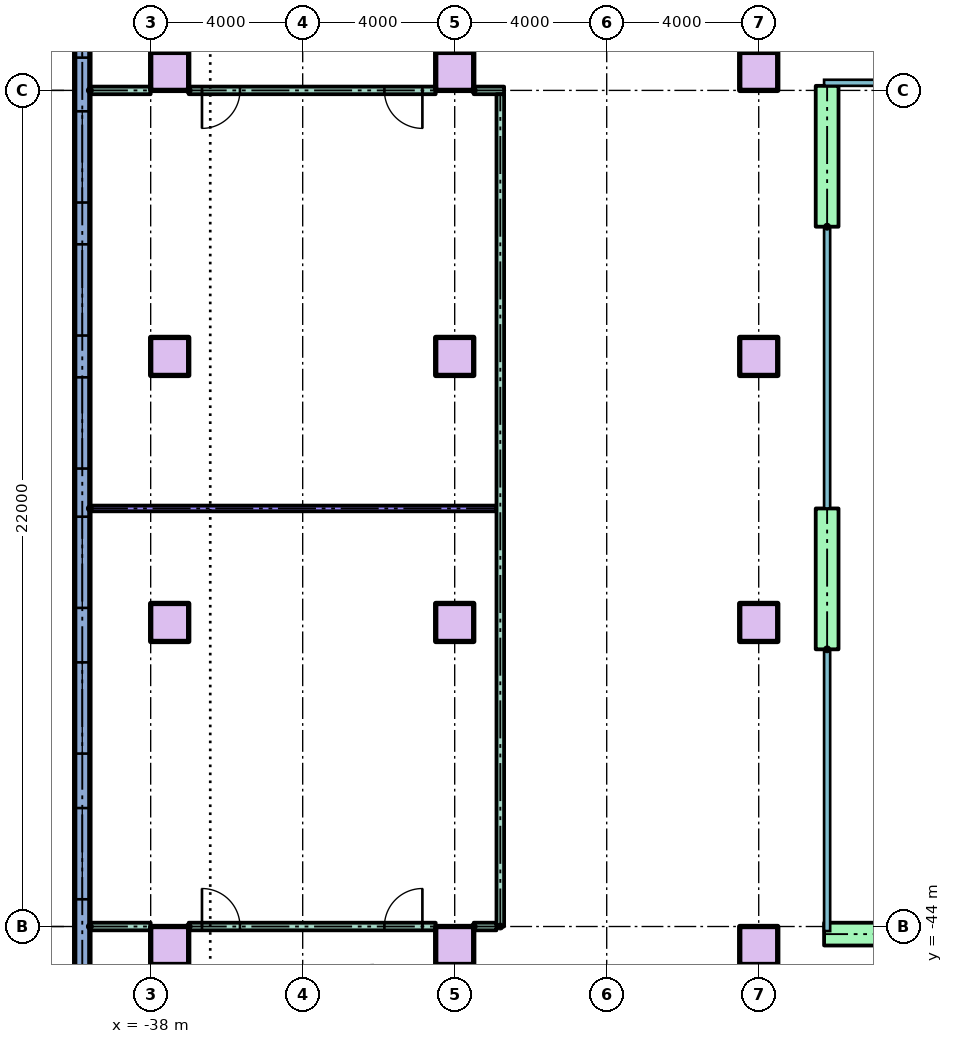
"""IFC4 building model, lengths in metres.
Left out: names, types, materials, properties, quantities, classifications, styles, units other than length and angle.
Written with IfcOpenShell. Run it as: python <this file> out.ifc"""

import sys

from ifc_helpers import new_model, si_unit, direction, frame, frame_2d, origin, origin_2d, place, context, subcontext, project, spatial, rectangle, extrude, element, fill, save


model = new_model("IFC4")
c1 = context("Model", 3, precision=1e-05, world=origin(), true_north=direction((0.0, 1.0)))
c2 = subcontext(c1, "Body", "Model", "MODEL_VIEW")
j1 = project(units=[si_unit("LENGTHUNIT", "METRE"), si_unit("PLANEANGLEUNIT", "RADIAN")], contexts=[c1])
p1 = place(None, origin())
s1 = spatial("IfcSite", under=j1, at=p1, CompositionType="ELEMENT")
p2 = place(p1, origin())
s2 = spatial("IfcBuilding", under=s1, at=p2, CompositionType="ELEMENT")
p3 = place(p2, frame((0.0, 0.0, 22.0)))
s3 = spatial("IfcBuildingStorey", under=s2, at=p3, CompositionType="ELEMENT", Elevation=22.0)
for number, where in (
    (1, (-37.5, -44.5, 0.0)),
    (2, (-30.0, -44.5, 0.0)),
    (3, (-22.0, -44.5, 0.0)),
    (4, (-37.5, -36.0, 0.0)),
    (5, (-30.0, -36.0, 0.0)),
    (6, (-22.0, -36.0, 0.0)),
    (7, (-37.5, -29.0, 0.0)),
    (8, (-30.0, -29.0, 0.0)),
    (9, (-22.0, -29.0, 0.0)),
    (10, (-37.5, -21.5, 0.0)),
    (11, (-30.0, -21.5, 0.0)),
    (12, (-22.0, -21.5, 0.0)),
):
    element("IfcColumn", number, at=place(p3, frame(where)), inside=s3, PredefinedType="COLUMN", context=c2, shape_type="SweptSolid", body=[
        extrude(rectangle(XDim=1.0, YDim=1.0, at=origin_2d()), origin(), (0.0, 0.0, 1.0), 3.7),
    ])
p4 = place(p3, frame((-39.8, 20.0, 0.0), z_axis=(0.0, 0.0, 1.0), x_axis=(0.0, -1.0, 0.0)))
e13 = element("IfcWall", 13, at=p4, inside=s3, PredefinedType="STANDARD", context=c2, shape_type="SweptSolid", body=[
    extrude(rectangle(XDim=70.0, YDim=0.4, at=frame_2d((35.0, 0.0))), origin(), (0.0, 0.0, 1.0), 3.7),
])
p5 = place(p4, frame((1.05, 0.0, 0.9)))
e14 = element("IfcOpeningElement", 14, at=p5, cuts=e13, PredefinedType="OPENING", context=c2, shape_type="SweptSolid", body=[
    extrude(rectangle(XDim=2.4, YDim=2.1, at=frame_2d((1.2, 1.05))), frame((0.0, 0.21, 0.0), z_axis=(0.0, -1.0, 0.0), x_axis=(1.0, 0.0, 0.0)), (0.0, 0.0, 1.0), 0.42),
])
p6 = place(p4, frame((5.55, 0.0, 0.9)))
e15 = element("IfcOpeningElement", 15, at=p6, cuts=e13, PredefinedType="OPENING", context=c2, shape_type="SweptSolid", body=[
    extrude(rectangle(XDim=2.4, YDim=2.1, at=frame_2d((1.2, 1.05))), frame((0.0, 0.21, 0.0), z_axis=(0.0, -1.0, 0.0), x_axis=(1.0, 0.0, 0.0)), (0.0, 0.0, 1.0), 0.42),
])
p7 = place(p4, frame((9.863, 0.0, 0.9)))
e16 = element("IfcOpeningElement", 16, at=p7, cuts=e13, PredefinedType="OPENING", context=c2, shape_type="SweptSolid", body=[
    extrude(rectangle(XDim=2.4, YDim=2.1, at=frame_2d((1.2, 1.05))), frame((0.0, 0.21, 0.0), z_axis=(0.0, -1.0, 0.0), x_axis=(1.0, 0.0, 0.0)), (0.0, 0.0, 1.0), 0.42),
])
p8 = place(p4, frame((13.988, 0.0, 0.9)))
e17 = element("IfcOpeningElement", 17, at=p8, cuts=e13, PredefinedType="OPENING", context=c2, shape_type="SweptSolid", body=[
    extrude(rectangle(XDim=2.4, YDim=2.1, at=frame_2d((1.2, 1.05))), frame((0.0, 0.21, 0.0), z_axis=(0.0, -1.0, 0.0), x_axis=(1.0, 0.0, 0.0)), (0.0, 0.0, 1.0), 0.42),
])
p9 = place(p4, frame((18.113, 0.0, 0.9)))
e18 = element("IfcOpeningElement", 18, at=p9, cuts=e13, PredefinedType="OPENING", context=c2, shape_type="SweptSolid", body=[
    extrude(rectangle(XDim=2.4, YDim=2.1, at=frame_2d((1.2, 1.05))), frame((0.0, 0.21, 0.0), z_axis=(0.0, -1.0, 0.0), x_axis=(1.0, 0.0, 0.0)), (0.0, 0.0, 1.0), 0.42),
])
p10 = place(p4, frame((22.238, 0.0, 0.9)))
e19 = element("IfcOpeningElement", 19, at=p10, cuts=e13, PredefinedType="OPENING", context=c2, shape_type="SweptSolid", body=[
    extrude(rectangle(XDim=2.4, YDim=2.1, at=frame_2d((1.2, 1.05))), frame((0.0, 0.21, 0.0), z_axis=(0.0, -1.0, 0.0), x_axis=(1.0, 0.0, 0.0)), (0.0, 0.0, 1.0), 0.42),
])
p11 = place(p4, frame((26.363, 0.0, 0.9)))
e20 = element("IfcOpeningElement", 20, at=p11, cuts=e13, PredefinedType="OPENING", context=c2, shape_type="SweptSolid", body=[
    extrude(rectangle(XDim=2.4, YDim=2.1, at=frame_2d((1.2, 1.05))), frame((0.0, 0.21, 0.0), z_axis=(0.0, -1.0, 0.0), x_axis=(1.0, 0.0, 0.0)), (0.0, 0.0, 1.0), 0.42),
])
p12 = place(p4, frame((30.488, 0.0, 0.9)))
e21 = element("IfcOpeningElement", 21, at=p12, cuts=e13, PredefinedType="OPENING", context=c2, shape_type="SweptSolid", body=[
    extrude(rectangle(XDim=2.4, YDim=2.1, at=frame_2d((1.2, 1.05))), frame((0.0, 0.21, 0.0), z_axis=(0.0, -1.0, 0.0), x_axis=(1.0, 0.0, 0.0)), (0.0, 0.0, 1.0), 0.42),
])
p13 = place(p4, frame((34.613, 0.0, 0.9)))
e22 = element("IfcOpeningElement", 22, at=p13, cuts=e13, PredefinedType="OPENING", context=c2, shape_type="SweptSolid", body=[
    extrude(rectangle(XDim=2.4, YDim=2.1, at=frame_2d((1.2, 1.05))), frame((0.0, 0.21, 0.0), z_axis=(0.0, -1.0, 0.0), x_axis=(1.0, 0.0, 0.0)), (0.0, 0.0, 1.0), 0.42),
])
p14 = place(p4, frame((38.738, 0.0, 0.9)))
e23 = element("IfcOpeningElement", 23, at=p14, cuts=e13, PredefinedType="OPENING", context=c2, shape_type="SweptSolid", body=[
    extrude(rectangle(XDim=2.4, YDim=2.1, at=frame_2d((1.2, 1.05))), frame((0.0, 0.21, 0.0), z_axis=(0.0, -1.0, 0.0), x_axis=(1.0, 0.0, 0.0)), (0.0, 0.0, 1.0), 0.42),
])
p15 = place(p4, frame((42.55, 0.0, 0.9)))
e24 = element("IfcOpeningElement", 24, at=p15, cuts=e13, PredefinedType="OPENING", context=c2, shape_type="SweptSolid", body=[
    extrude(rectangle(XDim=2.4, YDim=2.1, at=frame_2d((1.2, 1.05))), frame((0.0, 0.21, 0.0), z_axis=(0.0, -1.0, 0.0), x_axis=(1.0, 0.0, 0.0)), (0.0, 0.0, 1.0), 0.42),
])
p16 = place(p4, frame((46.05, 0.0, 0.9)))
e25 = element("IfcOpeningElement", 25, at=p16, cuts=e13, PredefinedType="OPENING", context=c2, shape_type="SweptSolid", body=[
    extrude(rectangle(XDim=2.4, YDim=2.1, at=frame_2d((1.2, 1.05))), frame((0.0, 0.21, 0.0), z_axis=(0.0, -1.0, 0.0), x_axis=(1.0, 0.0, 0.0)), (0.0, 0.0, 1.0), 0.42),
])
p17 = place(p4, frame((49.55, 0.0, 0.9)))
e26 = element("IfcOpeningElement", 26, at=p17, cuts=e13, PredefinedType="OPENING", context=c2, shape_type="SweptSolid", body=[
    extrude(rectangle(XDim=2.4, YDim=2.1, at=frame_2d((1.2, 1.05))), frame((0.0, 0.21, 0.0), z_axis=(0.0, -1.0, 0.0), x_axis=(1.0, 0.0, 0.0)), (0.0, 0.0, 1.0), 0.42),
])
p18 = place(p4, frame((53.217, 0.0, 0.9)))
e27 = element("IfcOpeningElement", 27, at=p18, cuts=e13, PredefinedType="OPENING", context=c2, shape_type="SweptSolid", body=[
    extrude(rectangle(XDim=2.4, YDim=2.1, at=frame_2d((1.2, 1.05))), frame((0.0, 0.21, 0.0), z_axis=(0.0, -1.0, 0.0), x_axis=(1.0, 0.0, 0.0)), (0.0, 0.0, 1.0), 0.42),
])
p19 = place(p4, frame((57.05, 0.0, 0.9)))
e28 = element("IfcOpeningElement", 28, at=p19, cuts=e13, PredefinedType="OPENING", context=c2, shape_type="SweptSolid", body=[
    extrude(rectangle(XDim=2.4, YDim=2.1, at=frame_2d((1.2, 1.05))), frame((0.0, 0.21, 0.0), z_axis=(0.0, -1.0, 0.0), x_axis=(1.0, 0.0, 0.0)), (0.0, 0.0, 1.0), 0.42),
])
p20 = place(p4, frame((60.883, 0.0, 0.9)))
e29 = element("IfcOpeningElement", 29, at=p20, cuts=e13, PredefinedType="OPENING", context=c2, shape_type="SweptSolid", body=[
    extrude(rectangle(XDim=2.4, YDim=2.1, at=frame_2d((1.2, 1.05))), frame((0.0, 0.21, 0.0), z_axis=(0.0, -1.0, 0.0), x_axis=(1.0, 0.0, 0.0)), (0.0, 0.0, 1.0), 0.42),
])
p21 = place(p4, frame((66.85, 0.0, 0.9)))
e30 = element("IfcOpeningElement", 30, at=p21, cuts=e13, PredefinedType="OPENING", context=c2, shape_type="SweptSolid", body=[
    extrude(rectangle(XDim=2.4, YDim=2.1, at=frame_2d((1.2, 1.05))), frame((0.0, 0.21, 0.0), z_axis=(0.0, -1.0, 0.0), x_axis=(1.0, 0.0, 0.0)), (0.0, 0.0, 1.0), 0.42),
])
p22 = place(p3, frame((-18.0, -44.2, 0.0), z_axis=(0.0, 0.0, 1.0), x_axis=(-1.0, 0.0, 0.0)))
e31 = element("IfcWall", 31, at=p22, inside=s3, PredefinedType="STANDARD", context=c2, shape_type="SweptSolid", body=[
    extrude(rectangle(XDim=2.28, YDim=0.6, at=frame_2d((1.14, 0.0))), origin(), (0.0, 0.0, 1.0), 3.7),
])
for number, where, z_axis, x_axis in (
    (32, (-20.2, -36.707, 0.0), (0.0, 0.0, 1.0), (0.0, 1.0, 0.0)),
    (33, (-20.2, -25.587, 0.0), (0.0, 0.0, 1.0), (0.0, 1.0, 0.0)),
):
    element("IfcWall", number, at=place(p3, frame(where, z_axis=z_axis, x_axis=x_axis)), inside=s3, PredefinedType="STANDARD", context=c2, shape_type="SweptSolid", body=[
        extrude(rectangle(XDim=3.707, YDim=0.6, at=frame_2d((1.854, 0.0))), origin(), (0.0, 0.0, 1.0), 3.7),
    ])
p23 = place(p3, frame((-39.6, -44.0, 0.0)))
e34 = element("IfcWall", 34, at=p23, inside=s3, PredefinedType="PARTITIONING", context=c2, shape_type="SweptSolid", body=[
    extrude(rectangle(XDim=1.6, YDim=0.2, at=frame_2d((0.8, 0.0))), origin(), (0.0, 0.0, 1.0), 3.2),
])
p24 = place(p3, frame((-37.0, -44.0, 0.0)))
e35 = element("IfcWall", 35, at=p24, inside=s3, PredefinedType="PARTITIONING", context=c2, shape_type="SweptSolid", body=[
    extrude(rectangle(XDim=6.5, YDim=0.2, at=frame_2d((3.25, 0.0))), origin(), (0.0, 0.0, 1.0), 3.2),
])
p25 = place(p24, frame((0.35, 0.0, 0.0)))
e36 = element("IfcOpeningElement", 36, at=p25, cuts=e35, PredefinedType="OPENING", context=c2, shape_type="SweptSolid", body=[
    extrude(rectangle(XDim=1.0, YDim=2.1, at=frame_2d((0.5, 1.05))), frame((0.0, 0.11, 0.0), z_axis=(0.0, -1.0, 0.0), x_axis=(1.0, 0.0, 0.0)), (0.0, 0.0, 1.0), 0.22),
])
p26 = place(p24, frame((5.15, 0.0, 0.0)))
e37 = element("IfcOpeningElement", 37, at=p26, cuts=e35, PredefinedType="OPENING", context=c2, shape_type="SweptSolid", body=[
    extrude(rectangle(XDim=1.0, YDim=2.1, at=frame_2d((0.5, 1.05))), frame((0.0, 0.11, 0.0), z_axis=(0.0, -1.0, 0.0), x_axis=(1.0, 0.0, 0.0)), (0.0, 0.0, 1.0), 0.22),
])
p27 = place(p3, frame((-29.5, -44.0, 0.0)))
e38 = element("IfcWall", 38, at=p27, inside=s3, PredefinedType="PARTITIONING", context=c2, shape_type="SweptSolid", body=[
    extrude(rectangle(XDim=0.6, YDim=0.2, at=frame_2d((0.3, 0.0))), origin(), (0.0, 0.0, 1.0), 3.2),
])
p28 = place(p3, frame((-39.6, -33.0, 0.0)))
e39 = element("IfcWall", 39, at=p28, inside=s3, PredefinedType="PARTITIONING", context=c2, shape_type="SweptSolid", body=[
    extrude(rectangle(XDim=10.7, YDim=0.15, at=frame_2d((5.35, 0.0))), origin(), (0.0, 0.0, 1.0), 3.2),
])
p29 = place(p3, frame((-39.6, -22.0, 0.0)))
e40 = element("IfcWall", 40, at=p29, inside=s3, PredefinedType="PARTITIONING", context=c2, shape_type="SweptSolid", body=[
    extrude(rectangle(XDim=1.6, YDim=0.2, at=frame_2d((0.8, 0.0))), origin(), (0.0, 0.0, 1.0), 3.2),
])
p30 = place(p3, frame((-37.0, -22.0, 0.0)))
e41 = element("IfcWall", 41, at=p30, inside=s3, PredefinedType="PARTITIONING", context=c2, shape_type="SweptSolid", body=[
    extrude(rectangle(XDim=6.5, YDim=0.2, at=frame_2d((3.25, 0.0))), origin(), (0.0, 0.0, 1.0), 3.2),
])
p31 = place(p30, frame((0.35, 0.0, 0.0)))
e42 = element("IfcOpeningElement", 42, at=p31, cuts=e41, PredefinedType="OPENING", context=c2, shape_type="SweptSolid", body=[
    extrude(rectangle(XDim=1.0, YDim=2.1, at=frame_2d((0.5, 1.05))), frame((0.0, 0.11, 0.0), z_axis=(0.0, -1.0, 0.0), x_axis=(1.0, 0.0, 0.0)), (0.0, 0.0, 1.0), 0.22),
])
p32 = place(p30, frame((5.15, 0.0, 0.0)))
e43 = element("IfcOpeningElement", 43, at=p32, cuts=e41, PredefinedType="OPENING", context=c2, shape_type="SweptSolid", body=[
    extrude(rectangle(XDim=1.0, YDim=2.1, at=frame_2d((0.5, 1.05))), frame((0.0, 0.11, 0.0), z_axis=(0.0, -1.0, 0.0), x_axis=(1.0, 0.0, 0.0)), (0.0, 0.0, 1.0), 0.22),
])
p33 = place(p3, frame((-29.5, -22.0, 0.0)))
e44 = element("IfcWall", 44, at=p33, inside=s3, PredefinedType="PARTITIONING", context=c2, shape_type="SweptSolid", body=[
    extrude(rectangle(XDim=0.8, YDim=0.2, at=frame_2d((0.4, 0.0))), origin(), (0.0, 0.0, 1.0), 3.2),
])
p34 = place(p3, frame((-28.8, -44.0, 0.0), z_axis=(0.0, 0.0, 1.0), x_axis=(0.0, 1.0, 0.0)))
e45 = element("IfcWall", 45, at=p34, inside=s3, PredefinedType="PARTITIONING", context=c2, shape_type="SweptSolid", body=[
    extrude(rectangle(XDim=21.9, YDim=0.2, at=frame_2d((10.95, 0.0))), origin(), (0.0, 0.0, 1.0), 3.2),
])
p35 = place(p14, origin())
e46 = element("IfcWindow", 46, at=p35, inside=s3, PartitioningType="SINGLE_PANEL", PredefinedType="WINDOW", context=c2, shape_type="SweptSolid", body=[
    extrude(rectangle(XDim=2.4, YDim=2.1, at=frame_2d((1.2, 1.05))), frame((0.0, 0.03, 0.0), z_axis=(0.0, -1.0, 0.0), x_axis=(1.0, 0.0, 0.0)), (0.0, 0.0, 1.0), 0.06),
])
fill(e23, e46)
p36 = place(p15, origin())
e47 = element("IfcWindow", 47, at=p36, inside=s3, PartitioningType="SINGLE_PANEL", PredefinedType="WINDOW", context=c2, shape_type="SweptSolid", body=[
    extrude(rectangle(XDim=2.4, YDim=2.1, at=frame_2d((1.2, 1.05))), frame((0.0, 0.03, 0.0), z_axis=(0.0, -1.0, 0.0), x_axis=(1.0, 0.0, 0.0)), (0.0, 0.0, 1.0), 0.06),
])
fill(e24, e47)
p37 = place(p16, origin())
e48 = element("IfcWindow", 48, at=p37, inside=s3, PartitioningType="SINGLE_PANEL", PredefinedType="WINDOW", context=c2, shape_type="SweptSolid", body=[
    extrude(rectangle(XDim=2.4, YDim=2.1, at=frame_2d((1.2, 1.05))), frame((0.0, 0.03, 0.0), z_axis=(0.0, -1.0, 0.0), x_axis=(1.0, 0.0, 0.0)), (0.0, 0.0, 1.0), 0.06),
])
fill(e25, e48)
p38 = place(p17, origin())
e49 = element("IfcWindow", 49, at=p38, inside=s3, PartitioningType="SINGLE_PANEL", PredefinedType="WINDOW", context=c2, shape_type="SweptSolid", body=[
    extrude(rectangle(XDim=2.4, YDim=2.1, at=frame_2d((1.2, 1.05))), frame((0.0, 0.03, 0.0), z_axis=(0.0, -1.0, 0.0), x_axis=(1.0, 0.0, 0.0)), (0.0, 0.0, 1.0), 0.06),
])
fill(e26, e49)
p39 = place(p18, origin())
e50 = element("IfcWindow", 50, at=p39, inside=s3, PartitioningType="SINGLE_PANEL", PredefinedType="WINDOW", context=c2, shape_type="SweptSolid", body=[
    extrude(rectangle(XDim=2.4, YDim=2.1, at=frame_2d((1.2, 1.05))), frame((0.0, 0.03, 0.0), z_axis=(0.0, -1.0, 0.0), x_axis=(1.0, 0.0, 0.0)), (0.0, 0.0, 1.0), 0.06),
])
fill(e27, e50)
p40 = place(p19, origin())
e51 = element("IfcWindow", 51, at=p40, inside=s3, PartitioningType="SINGLE_PANEL", PredefinedType="WINDOW", context=c2, shape_type="SweptSolid", body=[
    extrude(rectangle(XDim=2.4, YDim=2.1, at=frame_2d((1.2, 1.05))), frame((0.0, 0.03, 0.0), z_axis=(0.0, -1.0, 0.0), x_axis=(1.0, 0.0, 0.0)), (0.0, 0.0, 1.0), 0.06),
])
fill(e28, e51)
p41 = place(p20, origin())
e52 = element("IfcWindow", 52, at=p41, inside=s3, PartitioningType="SINGLE_PANEL", PredefinedType="WINDOW", context=c2, shape_type="SweptSolid", body=[
    extrude(rectangle(XDim=2.4, YDim=2.1, at=frame_2d((1.2, 1.05))), frame((0.0, 0.03, 0.0), z_axis=(0.0, -1.0, 0.0), x_axis=(1.0, 0.0, 0.0)), (0.0, 0.0, 1.0), 0.06),
])
fill(e29, e52)
p42 = place(p25, origin())
e53 = element("IfcDoor", 53, at=p42, inside=s3, OperationType="SINGLE_SWING_LEFT", PredefinedType="DOOR", context=c2, shape_type="SweptSolid", body=[
    extrude(rectangle(XDim=1.0, YDim=2.1, at=frame_2d((0.5, 1.05))), frame((0.0, 0.025, 0.0), z_axis=(0.0, -1.0, 0.0), x_axis=(1.0, 0.0, 0.0)), (0.0, 0.0, 1.0), 0.05),
])
fill(e36, e53)
p43 = place(p26, origin())
e54 = element("IfcDoor", 54, at=p43, inside=s3, OperationType="SINGLE_SWING_RIGHT", PredefinedType="DOOR", context=c2, shape_type="SweptSolid", body=[
    extrude(rectangle(XDim=1.0, YDim=2.1, at=frame_2d((0.5, 1.05))), frame((0.0, 0.025, 0.0), z_axis=(0.0, -1.0, 0.0), x_axis=(1.0, 0.0, 0.0)), (0.0, 0.0, 1.0), 0.05),
])
fill(e37, e54)
p44 = place(p31, frame((1.0, 0.0, 0.0), z_axis=(0.0, 0.0, 1.0), x_axis=(-1.0, 0.0, 0.0)))
e55 = element("IfcDoor", 55, at=p44, inside=s3, OperationType="SINGLE_SWING_LEFT", PredefinedType="DOOR", context=c2, shape_type="SweptSolid", body=[
    extrude(rectangle(XDim=1.0, YDim=2.1, at=frame_2d((0.5, 1.05))), frame((0.0, 0.025, 0.0), z_axis=(0.0, -1.0, 0.0), x_axis=(1.0, 0.0, 0.0)), (0.0, 0.0, 1.0), 0.05),
])
fill(e42, e55)
p45 = place(p32, frame((1.0, 0.0, 0.0), z_axis=(0.0, 0.0, 1.0), x_axis=(-1.0, 0.0, 0.0)))
e56 = element("IfcDoor", 56, at=p45, inside=s3, OperationType="SINGLE_SWING_RIGHT", PredefinedType="DOOR", context=c2, shape_type="SweptSolid", body=[
    extrude(rectangle(XDim=1.0, YDim=2.1, at=frame_2d((0.5, 1.05))), frame((0.0, 0.025, 0.0), z_axis=(0.0, -1.0, 0.0), x_axis=(1.0, 0.0, 0.0)), (0.0, 0.0, 1.0), 0.05),
])
fill(e43, e56)
save(model, sys.argv[1])
